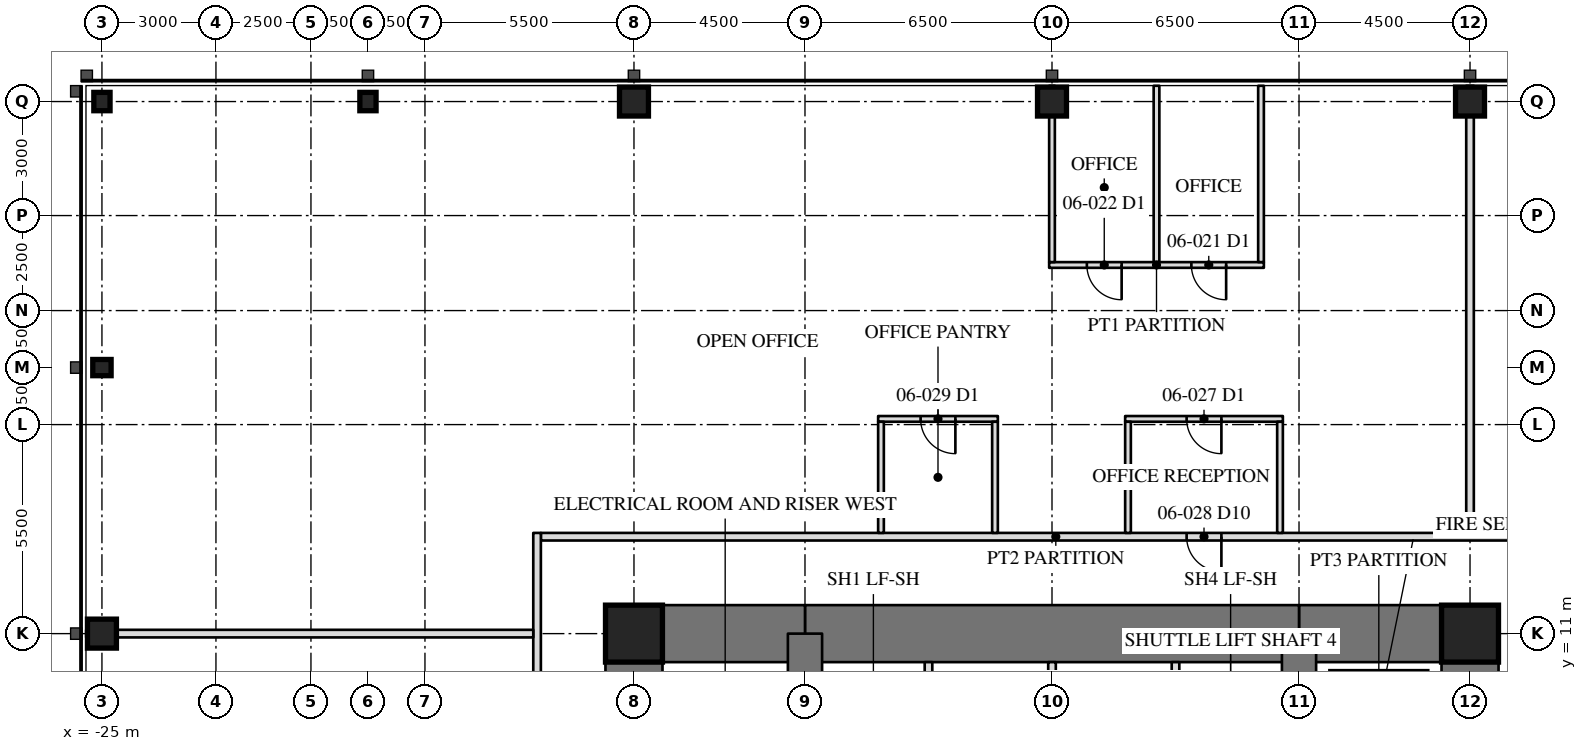
"""IFC4 building model, lengths in metres.
Left out: names, types, materials, properties, quantities, classifications, styles, units other than length and angle.
Written with IfcOpenShell. Run it as: python <this file> out.ifc"""

import sys

from ifc_helpers import new_model, si_unit, direction, frame, frame_2d, origin, origin_2d, place, context, subcontext, project, spatial, rectangle, hollow_rectangle, i_section, extrude, element, fill, save


model = new_model("IFC4")
c1 = context("Model", 3, precision=1e-05, world=origin(), true_north=direction((0.0, 1.0)))
c2 = subcontext(c1, "Body", "Model", "MODEL_VIEW")
j1 = project(units=[si_unit("LENGTHUNIT", "METRE"), si_unit("PLANEANGLEUNIT", "RADIAN")], contexts=[c1])
p1 = place(None, origin())
s1 = spatial("IfcSite", under=j1, at=p1, CompositionType="ELEMENT")
p2 = place(p1, origin())
s2 = spatial("IfcBuilding", under=s1, at=p2, CompositionType="ELEMENT")
p3 = place(p2, frame((0.0, 0.0, 28.3)))
s3 = spatial("IfcBuildingStorey", under=s2, at=p3, CompositionType="ELEMENT", Elevation=28.3)
for number, where, z_axis, x_axis in (
    (1, (11.0, 25.0, 0.0), (0.0, 0.0, 1.0), (1.0, 0.0, 0.0)),
    (2, (0.0, 25.0, 0.0), (0.0, 0.0, 1.0), (1.0, 0.0, 0.0)),
    (3, (-11.0, 25.0, 0.0), (0.0, 0.0, 1.0), (1.0, 0.0, 0.0)),
):
    element("IfcColumn", number, at=place(p3, frame(where, z_axis=z_axis, x_axis=x_axis)), inside=s3, PredefinedType="COLUMN", context=c2, shape_type="SweptSolid", body=[
        extrude(hollow_rectangle(XDim=0.762, YDim=0.762, WallThickness=0.127, at=origin_2d()), origin(), (0.0, 0.0, 1.0), 4.1),
    ])
for number, where, z_axis, x_axis in (
    (4, (-18.0, 25.0, 0.0), (0.0, 0.0, 1.0), (1.0, 0.0, 0.0)),
    (5, (-25.0, 25.0, 0.0), (0.0, 0.0, 1.0), (1.0, 0.0, 0.0)),
    (6, (-25.0, 18.0, 0.0), (0.0, 0.0, 1.0), (0.0, 1.0, 0.0)),
):
    element("IfcColumn", number, at=place(p3, frame(where, z_axis=z_axis, x_axis=x_axis)), inside=s3, PredefinedType="COLUMN", context=c2, shape_type="SweptSolid", body=[
        extrude(i_section(OverallWidth=0.427, OverallDepth=0.483, WebThickness=0.051, FlangeThickness=0.082, at=origin_2d()), origin(), (0.0, 0.0, 1.0), 4.1),
    ])
p4 = place(p3, frame((-25.0, 11.0, 0.0), z_axis=(0.0, 0.0, 1.0), x_axis=(0.0, 1.0, 0.0)))
e7 = element("IfcColumn", 7, at=p4, inside=s3, PredefinedType="COLUMN", context=c2, shape_type="SweptSolid", body=[
    extrude(hollow_rectangle(XDim=0.762, YDim=0.762, WallThickness=0.127, at=origin_2d()), origin(), (0.0, 0.0, 1.0), 4.1),
])
p5 = place(p3, frame((11.0, -11.0, 0.0), z_axis=(0.0, 0.0, 1.0), x_axis=(0.0, 1.0, 0.0)))
e8 = element("IfcWall", 8, at=p5, inside=s3, PredefinedType="SHEAR", context=c2, shape_type="SweptSolid", body=[
    extrude(rectangle(XDim=22.0, YDim=1.5, at=frame_2d((11.0, 0.0))), origin(), (0.0, 0.0, 1.0), 4.1),
])
p6 = place(p5, frame((15.393, 0.0, 0.0)))
e9 = element("IfcOpeningElement", 9, at=p6, cuts=e8, PredefinedType="OPENING", context=c2, shape_type="SweptSolid", body=[
    extrude(rectangle(XDim=0.915, YDim=2.134, at=frame_2d((0.458, 1.067))), frame((0.0, 0.76, 0.0), z_axis=(0.0, -1.0, 0.0), x_axis=(1.0, 0.0, 0.0)), (0.0, 0.0, 1.0), 1.52),
])
p7 = place(p3, frame((-11.0, 11.0, 0.0), z_axis=(0.0, 0.0, 1.0), x_axis=(0.0, -1.0, 0.0)))
e10 = element("IfcWall", 10, at=p7, inside=s3, PredefinedType="SHEAR", context=c2, shape_type="SweptSolid", body=[
    extrude(rectangle(XDim=22.0, YDim=1.5, at=frame_2d((11.0, 0.0))), origin(), (0.0, 0.0, 1.0), 4.1),
])
p8 = place(p7, frame((15.393, 0.0, 0.0)))
e11 = element("IfcOpeningElement", 11, at=p8, cuts=e10, PredefinedType="OPENING", context=c2, shape_type="SweptSolid", body=[
    extrude(rectangle(XDim=0.915, YDim=2.134, at=frame_2d((0.458, 1.067))), frame((0.0, 0.76, 0.0), z_axis=(0.0, -1.0, 0.0), x_axis=(1.0, 0.0, 0.0)), (0.0, 0.0, 1.0), 1.52),
])
p9 = place(p3, frame((11.0, 11.0, 0.0), z_axis=(0.0, 0.0, 1.0), x_axis=(-1.0, 0.0, 0.0)))
e12 = element("IfcWall", 12, at=p9, inside=s3, PredefinedType="SHEAR", context=c2, shape_type="SweptSolid", body=[
    extrude(rectangle(XDim=4.5, YDim=1.5, at=frame_2d((2.25, 0.0))), origin(), (0.0, 0.0, 1.0), 4.1),
])
p10 = place(p3, frame((6.5, 11.0, 0.0), z_axis=(0.0, 0.0, 1.0), x_axis=(-1.0, 0.0, 0.0)))
e13 = element("IfcWall", 13, at=p10, inside=s3, PredefinedType="SHEAR", context=c2, shape_type="SweptSolid", body=[
    extrude(rectangle(XDim=13.0, YDim=1.5, at=frame_2d((6.5, 0.0))), origin(), (0.0, 0.0, 1.0), 4.1),
])
p11 = place(p3, frame((-6.5, 11.0, 0.0), z_axis=(0.0, 0.0, 1.0), x_axis=(-1.0, 0.0, 0.0)))
e14 = element("IfcWall", 14, at=p11, inside=s3, PredefinedType="SHEAR", context=c2, shape_type="SweptSolid", body=[
    extrude(rectangle(XDim=4.5, YDim=1.5, at=frame_2d((2.25, 0.0))), origin(), (0.0, 0.0, 1.0), 4.1),
])
for number, where, z_axis, x_axis in (
    (15, (6.5, 6.5, 0.0), (0.0, 0.0, 1.0), (0.0, 1.0, 0.0)),
    (16, (-6.5, 11.0, 0.0), (0.0, 0.0, 1.0), (0.0, -1.0, 0.0)),
):
    element("IfcWall", number, at=place(p3, frame(where, z_axis=z_axis, x_axis=x_axis)), inside=s3, PredefinedType="SHEAR", context=c2, shape_type="SweptSolid", body=[
        extrude(rectangle(XDim=4.5, YDim=0.9, at=frame_2d((2.25, 0.0))), origin(), (0.0, 0.0, 1.0), 4.1),
    ])
for number, where, z_axis, x_axis in (
    (17, (11.0, 11.0, 0.0), (0.0, 0.0, 1.0), (1.0, 0.0, 0.0)),
    (18, (-11.0, 11.0, 0.0), (0.0, 0.0, 1.0), (1.0, 0.0, 0.0)),
):
    element("IfcColumn", number, at=place(p3, frame(where, z_axis=z_axis, x_axis=x_axis)), inside=s3, PredefinedType="COLUMN", context=c2, shape_type="SweptSolid", body=[
        extrude(hollow_rectangle(XDim=1.499, YDim=1.499, WallThickness=0.102, at=origin_2d()), origin(), (0.0, 0.0, 1.0), 4.1),
    ])
for number, where, z_axis, x_axis in (
    (19, (-3.25, 6.95, 0.0), (0.0, 0.0, 1.0), (0.0, 1.0, 0.0)),
    (20, (0.0, 6.95, 0.0), (0.0, 0.0, 1.0), (0.0, 1.0, 0.0)),
    (21, (3.25, 6.95, 0.0), (0.0, 0.0, 1.0), (0.0, 1.0, 0.0)),
):
    element("IfcWall", number, at=place(p3, frame(where, z_axis=z_axis, x_axis=x_axis)), inside=s3, PredefinedType="PARTITIONING", context=c2, shape_type="SweptSolid", body=[
        extrude(rectangle(XDim=3.3, YDim=0.2, at=frame_2d((1.65, 0.0))), origin(), (0.0, 0.0, 1.0), 3.91),
    ])
p12 = place(p3, frame((13.65, 13.55, 0.0), z_axis=(0.0, 0.0, 1.0), x_axis=(-1.0, 0.0, 0.0)))
e22 = element("IfcWall", 22, at=p12, inside=s3, PredefinedType="PARTITIONING", context=c2, shape_type="SweptSolid", body=[
    extrude(rectangle(XDim=27.1, YDim=0.2, at=frame_2d((13.55, 0.0))), origin(), (0.0, 0.0, 1.0), 3.91),
])
p13 = place(p12, frame((9.192, 0.0, 0.0)))
e23 = element("IfcOpeningElement", 23, at=p13, cuts=e22, PredefinedType="OPENING", context=c2, shape_type="SweptSolid", body=[
    extrude(rectangle(XDim=0.915, YDim=2.134, at=frame_2d((0.458, 1.067))), frame((0.0, 0.11, 0.0), z_axis=(0.0, -1.0, 0.0), x_axis=(1.0, 0.0, 0.0)), (0.0, 0.0, 1.0), 0.22),
])
p14 = place(p3, frame((-13.55, 13.65, 0.0), z_axis=(0.0, 0.0, 1.0), x_axis=(0.0, -1.0, 0.0)))
e24 = element("IfcWall", 24, at=p14, inside=s3, PredefinedType="PARTITIONING", context=c2, shape_type="SweptSolid", body=[
    extrude(rectangle(XDim=27.1, YDim=0.2, at=frame_2d((13.55, 0.0))), origin(), (0.0, 0.0, 1.0), 3.91),
])
p15 = place(p14, frame((6.192, 0.0, 0.0)))
e25 = element("IfcOpeningElement", 25, at=p15, cuts=e24, PredefinedType="OPENING", context=c2, shape_type="SweptSolid", body=[
    extrude(rectangle(XDim=0.915, YDim=2.134, at=frame_2d((0.458, 1.067))), frame((0.0, 0.11, 0.0), z_axis=(0.0, -1.0, 0.0), x_axis=(1.0, 0.0, 0.0)), (0.0, 0.0, 1.0), 0.22),
])
for number, where, z_axis, x_axis in (
    (26, (11.0, 13.65, 0.0), (0.0, 0.0, 1.0), (0.0, 1.0, 0.0)),
    (27, (-13.65, 11.0, 0.0), (0.0, 0.0, 1.0), (-1.0, 0.0, 0.0)),
):
    element("IfcWall", number, at=place(p3, frame(where, z_axis=z_axis, x_axis=x_axis)), inside=s3, PredefinedType="PARTITIONING", context=c2, shape_type="SweptSolid", body=[
        extrude(rectangle(XDim=11.765, YDim=0.2, at=frame_2d((5.883, 0.0))), origin(), (0.0, 0.0, 1.0), 3.13),
    ])
p16 = place(p3, frame((5.575, 20.7, 0.0), z_axis=(0.0, 0.0, 1.0), x_axis=(-1.0, 0.0, 0.0)))
e28 = element("IfcWall", 28, at=p16, inside=s3, PredefinedType="PARTITIONING", context=c2, shape_type="SweptSolid", body=[
    extrude(rectangle(XDim=5.65, YDim=0.15, at=frame_2d((2.825, 0.0))), origin(), (0.0, 0.0, 1.0), 3.91),
])
p17 = place(p16, frame((0.992, 0.0, 0.0)))
e29 = element("IfcOpeningElement", 29, at=p17, cuts=e28, PredefinedType="OPENING", context=c2, shape_type="SweptSolid", body=[
    extrude(rectangle(XDim=0.915, YDim=2.134, at=frame_2d((0.458, 1.067))), frame((0.0, 0.085, 0.0), z_axis=(0.0, -1.0, 0.0), x_axis=(1.0, 0.0, 0.0)), (0.0, 0.0, 1.0), 0.17),
])
p18 = place(p16, frame((3.742, 0.0, 0.0)))
e30 = element("IfcOpeningElement", 30, at=p18, cuts=e28, PredefinedType="OPENING", context=c2, shape_type="SweptSolid", body=[
    extrude(rectangle(XDim=0.915, YDim=2.134, at=frame_2d((0.458, 1.067))), frame((0.0, 0.085, 0.0), z_axis=(0.0, -1.0, 0.0), x_axis=(1.0, 0.0, 0.0)), (0.0, 0.0, 1.0), 0.17),
])
for number, where, z_axis, x_axis in (
    (31, (5.5, 20.775, 0.0), (0.0, 0.0, 1.0), (0.0, 1.0, 0.0)),
    (32, (2.75, 20.775, 0.0), (0.0, 0.0, 1.0), (0.0, 1.0, 0.0)),
):
    element("IfcWall", number, at=place(p3, frame(where, z_axis=z_axis, x_axis=x_axis)), inside=s3, PredefinedType="PARTITIONING", context=c2, shape_type="SweptSolid", body=[
        extrude(rectangle(XDim=4.64, YDim=0.15, at=frame_2d((2.32, 0.0))), origin(), (0.0, 0.0, 1.0), 3.91),
    ])
p19 = place(p3, frame((0.0, 20.775, 0.0), z_axis=(0.0, 0.0, 1.0), x_axis=(0.0, 1.0, 0.0)))
e33 = element("IfcWall", 33, at=p19, inside=s3, PredefinedType="PARTITIONING", context=c2, shape_type="SweptSolid", body=[
    extrude(rectangle(XDim=4.64, YDim=0.15, at=frame_2d((2.32, 0.0))), origin(), (0.0, 0.0, 1.0), 3.13),
])
p20 = place(p3, frame((6.075, 16.65, 0.0), z_axis=(0.0, 0.0, 1.0), x_axis=(-1.0, 0.0, 0.0)))
e34 = element("IfcWall", 34, at=p20, inside=s3, PredefinedType="PARTITIONING", context=c2, shape_type="SweptSolid", body=[
    extrude(rectangle(XDim=4.15, YDim=0.15, at=frame_2d((2.075, 0.0))), origin(), (0.0, 0.0, 1.0), 3.91),
])
p21 = place(p20, frame((1.617, 0.0, 0.0)))
e35 = element("IfcOpeningElement", 35, at=p21, cuts=e34, PredefinedType="OPENING", context=c2, shape_type="SweptSolid", body=[
    extrude(rectangle(XDim=0.915, YDim=2.134, at=frame_2d((0.458, 1.067))), frame((0.0, 0.085, 0.0), z_axis=(0.0, -1.0, 0.0), x_axis=(1.0, 0.0, 0.0)), (0.0, 0.0, 1.0), 0.17),
])
for number, where, z_axis, x_axis in (
    (36, (6.0, 16.575, 0.0), (0.0, 0.0, 1.0), (0.0, -1.0, 0.0)),
    (37, (2.0, 16.575, 0.0), (0.0, 0.0, 1.0), (0.0, -1.0, 0.0)),
):
    element("IfcWall", number, at=place(p3, frame(where, z_axis=z_axis, x_axis=x_axis)), inside=s3, PredefinedType="PARTITIONING", context=c2, shape_type="SweptSolid", body=[
        extrude(rectangle(XDim=2.925, YDim=0.15, at=frame_2d((1.462, 0.0))), origin(), (0.0, 0.0, 1.0), 3.91),
    ])
p22 = place(p3, frame((-1.425, 16.65, 0.0), z_axis=(0.0, 0.0, 1.0), x_axis=(-1.0, 0.0, 0.0)))
e38 = element("IfcWall", 38, at=p22, inside=s3, PredefinedType="PARTITIONING", context=c2, shape_type="SweptSolid", body=[
    extrude(rectangle(XDim=3.15, YDim=0.15, at=frame_2d((1.575, 0.0))), origin(), (0.0, 0.0, 1.0), 3.91),
])
p23 = place(p22, frame((1.117, 0.0, 0.0)))
e39 = element("IfcOpeningElement", 39, at=p23, cuts=e38, PredefinedType="OPENING", context=c2, shape_type="SweptSolid", body=[
    extrude(rectangle(XDim=0.915, YDim=2.134, at=frame_2d((0.458, 1.067))), frame((0.0, 0.085, 0.0), z_axis=(0.0, -1.0, 0.0), x_axis=(1.0, 0.0, 0.0)), (0.0, 0.0, 1.0), 0.17),
])
for number, where, z_axis, x_axis in (
    (40, (-1.5, 16.575, 0.0), (0.0, 0.0, 1.0), (0.0, -1.0, 0.0)),
    (41, (-4.5, 16.575, 0.0), (0.0, 0.0, 1.0), (0.0, -1.0, 0.0)),
):
    element("IfcWall", number, at=place(p3, frame(where, z_axis=z_axis, x_axis=x_axis)), inside=s3, PredefinedType="PARTITIONING", context=c2, shape_type="SweptSolid", body=[
        extrude(rectangle(XDim=2.925, YDim=0.15, at=frame_2d((1.462, 0.0))), origin(), (0.0, 0.0, 1.0), 3.91),
    ])
p24 = place(p17, origin())
e42 = element("IfcDoor", 42, at=p24, inside=s3, OperationType="SINGLE_SWING_LEFT", PredefinedType="DOOR", context=c2, shape_type="SweptSolid", body=[
    extrude(rectangle(XDim=0.915, YDim=2.134, at=frame_2d((0.458, 1.067))), frame((0.0, 0.025, 0.0), z_axis=(0.0, -1.0, 0.0), x_axis=(1.0, 0.0, 0.0)), (0.0, 0.0, 1.0), 0.05),
])
fill(e29, e42)
p25 = place(p18, origin())
e43 = element("IfcDoor", 43, at=p25, inside=s3, OperationType="SINGLE_SWING_LEFT", PredefinedType="DOOR", context=c2, shape_type="SweptSolid", body=[
    extrude(rectangle(XDim=0.915, YDim=2.134, at=frame_2d((0.458, 1.067))), frame((0.0, 0.025, 0.0), z_axis=(0.0, -1.0, 0.0), x_axis=(1.0, 0.0, 0.0)), (0.0, 0.0, 1.0), 0.05),
])
fill(e30, e43)
p26 = place(p21, origin())
e44 = element("IfcDoor", 44, at=p26, inside=s3, OperationType="SINGLE_SWING_LEFT", PredefinedType="DOOR", context=c2, shape_type="SweptSolid", body=[
    extrude(rectangle(XDim=0.915, YDim=2.134, at=frame_2d((0.458, 1.067))), frame((0.0, 0.025, 0.0), z_axis=(0.0, -1.0, 0.0), x_axis=(1.0, 0.0, 0.0)), (0.0, 0.0, 1.0), 0.05),
])
fill(e35, e44)
p27 = place(p13, origin())
e45 = element("IfcDoor", 45, at=p27, inside=s3, OperationType="SINGLE_SWING_LEFT", PredefinedType="DOOR", context=c2, shape_type="SweptSolid", body=[
    extrude(rectangle(XDim=0.915, YDim=2.134, at=frame_2d((0.458, 1.067))), frame((0.0, 0.025, 0.0), z_axis=(0.0, -1.0, 0.0), x_axis=(1.0, 0.0, 0.0)), (0.0, 0.0, 1.0), 0.05),
])
fill(e23, e45)
p28 = place(p23, origin())
e46 = element("IfcDoor", 46, at=p28, inside=s3, OperationType="SINGLE_SWING_LEFT", PredefinedType="DOOR", context=c2, shape_type="SweptSolid", body=[
    extrude(rectangle(XDim=0.915, YDim=2.134, at=frame_2d((0.458, 1.067))), frame((0.0, 0.025, 0.0), z_axis=(0.0, -1.0, 0.0), x_axis=(1.0, 0.0, 0.0)), (0.0, 0.0, 1.0), 0.05),
])
fill(e39, e46)
save(model, sys.argv[1])
